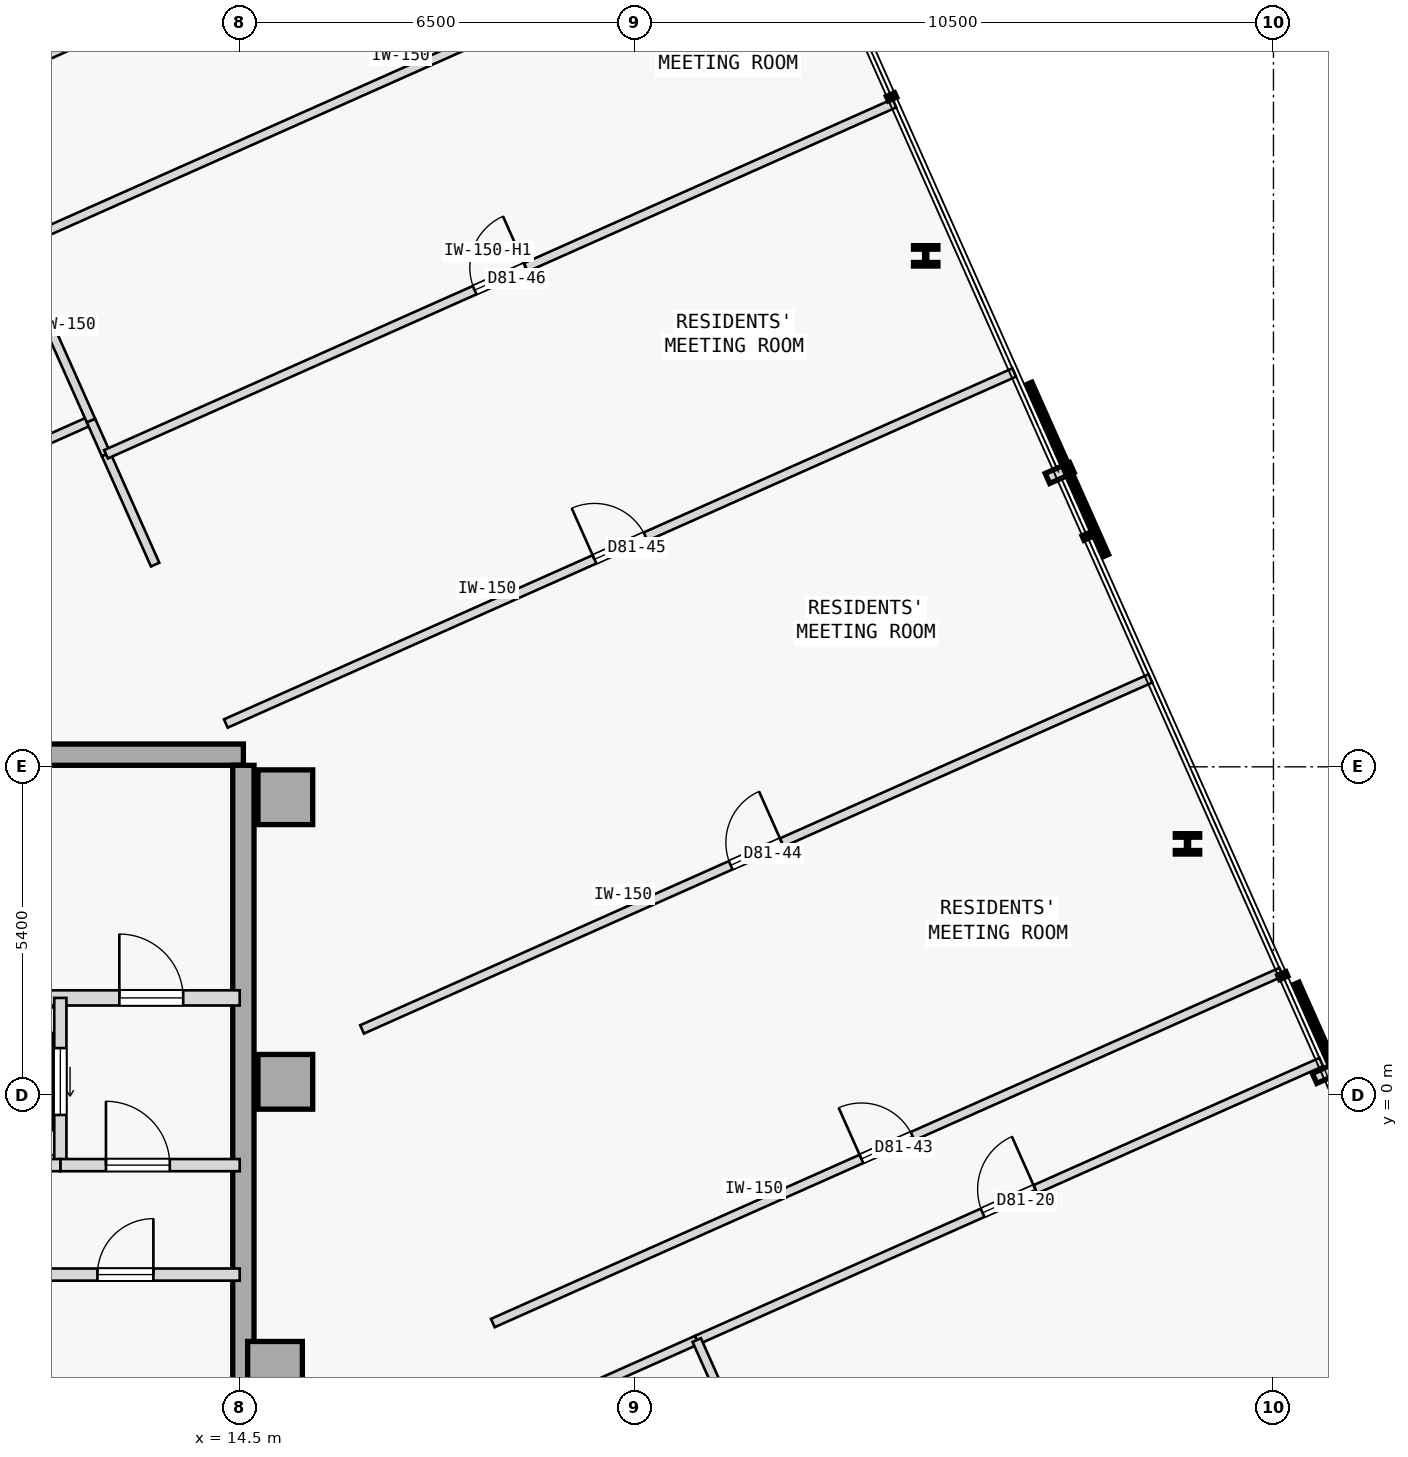
"""IFC4 building model, lengths in metres.
Left out: names, types, materials, properties, quantities, classifications, styles, units other than length and angle.
Written with IfcOpenShell. Run it as: python <this file> out.ifc"""

import sys

from ifc_helpers import new_model, si_unit, direction, frame, frame_2d, origin, origin_2d, place, context, subcontext, project, spatial, rectangle, i_section, extrude, element, fill, save


model = new_model("IFC4")
c1 = context("Model", 3, precision=1e-05, world=origin(), true_north=direction((0.0, 1.0)))
c2 = subcontext(c1, "Body", "Model", "MODEL_VIEW")
j1 = project(units=[si_unit("LENGTHUNIT", "METRE"), si_unit("PLANEANGLEUNIT", "RADIAN")], contexts=[c1])
p1 = place(None, origin())
s1 = spatial("IfcSite", under=j1, at=p1, CompositionType="ELEMENT")
p2 = place(p1, origin())
s2 = spatial("IfcBuilding", under=s1, at=p2, CompositionType="ELEMENT")
p3 = place(p2, frame((0.0, 0.0, 302.0)))
s3 = spatial("IfcBuildingStorey", under=s2, at=p3, CompositionType="ELEMENT", Elevation=302.0)
for number, where, z_axis, x_axis in (
    (1, (15.25, 4.9, 0.0), (0.0, 0.0, 1.0), (1.0, 0.0, 0.0)),
    (2, (15.25, 0.22, 0.0), (0.0, 0.0, 1.0), (1.0, 0.0, 0.0)),
    (3, (15.08, -4.5, 0.0), (0.0, 0.0, 1.0), (1.0, 0.0, 0.0)),
):
    element("IfcColumn", number, at=place(p3, frame(where, z_axis=z_axis, x_axis=x_axis)), inside=s3, PredefinedType="COLUMN", context=c2, shape_type="SweptSolid", body=[
        extrude(rectangle(XDim=0.9, YDim=0.9, at=origin_2d()), origin(), (0.0, 0.0, 1.0), 3.55),
    ])
p4 = place(p3, frame((3.15, 5.6, 0.0), z_axis=(0.0, 0.0, 1.0), x_axis=(1.0, 0.0, 0.0)))
e4 = element("IfcWall", 4, at=p4, inside=s3, PredefinedType="SHEAR", context=c2, shape_type="SweptSolid", body=[
    extrude(rectangle(XDim=11.41, YDim=0.35, at=frame_2d((5.705, 0.0))), origin(), (0.0, 0.0, 1.0), 3.145),
])
p5 = place(p3, frame((14.56, -5.425, 0.0), z_axis=(0.0, 0.0, 1.0), x_axis=(0.0, 1.0, 0.0)))
e5 = element("IfcWall", 5, at=p5, inside=s3, PredefinedType="SHEAR", context=c2, shape_type="SweptSolid", body=[
    extrude(rectangle(XDim=10.85, YDim=0.35, at=frame_2d((5.425, 0.0))), origin(), (0.0, 0.0, 1.0), 3.145),
])
for number, where, z_axis, x_axis in (
    (6, (30.086, 4.133, 0.0), (0.0, 0.0, 1.0), (1.0, 0.0, 0.0)),
    (7, (25.781, 13.803, 0.0), (0.0, 0.0, 1.0), (1.0, 0.0, 0.0)),
):
    element("IfcColumn", number, at=place(p3, frame(where, z_axis=z_axis, x_axis=x_axis)), inside=s3, PredefinedType="COLUMN", context=c2, shape_type="SweptSolid", body=[
        extrude(i_section(OverallWidth=0.401, OverallDepth=0.335, WebThickness=0.036, FlangeThickness=0.058, FilletRadius=0.015, at=origin_2d()), origin(), (0.0, 0.0, 1.0), 3.55),
    ])
p6 = place(p3, frame((10.9, 1.6, 0.0), z_axis=(0.0, 0.0, 1.0), x_axis=(1.0, 0.0, 0.0)))
e8 = element("IfcWall", 8, at=p6, inside=s3, PredefinedType="STANDARD", context=c2, shape_type="SweptSolid", body=[
    extrude(rectangle(XDim=3.6, YDim=0.25, at=frame_2d((1.8, 0.0))), origin(), (0.0, 0.0, 1.0), 3.145),
])
p7 = place(p6, frame((1.62, 0.0, 0.0)))
e9 = element("IfcOpeningElement", 9, at=p7, cuts=e8, PredefinedType="OPENING", context=c2, shape_type="SweptSolid", body=[
    extrude(rectangle(XDim=1.05, YDim=2.15, at=frame_2d((0.525, 1.075))), frame((0.0, 0.135, 0.0), z_axis=(0.0, -1.0, 0.0), x_axis=(1.0, 0.0, 0.0)), (0.0, 0.0, 1.0), 0.27),
])
p8 = place(p3, frame((11.55, -1.15, 0.0), z_axis=(0.0, 0.0, 1.0), x_axis=(0.0, 1.0, 0.0)))
e10 = element("IfcWall", 10, at=p8, inside=s3, PredefinedType="STANDARD", context=c2, shape_type="SweptSolid", body=[
    extrude(rectangle(XDim=2.75, YDim=0.2, at=frame_2d((1.375, 0.0))), origin(), (0.0, 0.0, 1.0), 3.145),
])
p9 = place(p8, frame((0.825, 0.0, 0.0)))
e11 = element("IfcOpeningElement", 11, at=p9, cuts=e10, PredefinedType="OPENING", context=c2, shape_type="SweptSolid", body=[
    extrude(rectangle(XDim=1.1, YDim=2.15, at=frame_2d((0.55, 1.075))), frame((0.0, 0.11, 0.0), z_axis=(0.0, -1.0, 0.0), x_axis=(1.0, 0.0, 0.0)), (0.0, 0.0, 1.0), 0.22),
])
p10 = place(p3, frame((11.55, -1.15, 0.0), z_axis=(0.0, 0.0, 1.0), x_axis=(1.0, 0.0, 0.0)))
e12 = element("IfcWall", 12, at=p10, inside=s3, PredefinedType="STANDARD", context=c2, shape_type="SweptSolid", body=[
    extrude(rectangle(XDim=2.95, YDim=0.2, at=frame_2d((1.475, 0.0))), origin(), (0.0, 0.0, 1.0), 3.145),
])
p11 = place(p10, frame((0.75, 0.0, 0.0)))
e13 = element("IfcOpeningElement", 13, at=p11, cuts=e12, PredefinedType="OPENING", context=c2, shape_type="SweptSolid", body=[
    extrude(rectangle(XDim=1.05, YDim=2.18, at=frame_2d((0.525, 1.09))), frame((0.0, 0.11, 0.0), z_axis=(0.0, -1.0, 0.0), x_axis=(1.0, 0.0, 0.0)), (0.0, 0.0, 1.0), 0.22),
])
p12 = place(p3, frame((9.35, -1.15, 0.0), z_axis=(0.0, 0.0, 1.0), x_axis=(1.0, 0.0, 0.0)))
e14 = element("IfcWall", 14, at=p12, inside=s3, PredefinedType="STANDARD", context=c2, shape_type="SweptSolid", body=[
    extrude(rectangle(XDim=2.2, YDim=0.2, at=frame_2d((1.1, 0.0))), origin(), (0.0, 0.0, 1.0), 3.145),
])
p13 = place(p3, frame((3.7, -2.95, 0.0), z_axis=(0.0, 0.0, 1.0), x_axis=(1.0, 0.0, 0.0)))
e15 = element("IfcWall", 15, at=p13, inside=s3, PredefinedType="STANDARD", context=c2, shape_type="SweptSolid", body=[
    extrude(rectangle(XDim=10.8, YDim=0.2, at=frame_2d((5.4, 0.0))), origin(), (0.0, 0.0, 1.0), 3.145),
])
p14 = place(p13, frame((0.53, 0.0, 0.0)))
e16 = element("IfcOpeningElement", 16, at=p14, cuts=e15, PredefinedType="OPENING", context=c2, shape_type="SweptSolid", body=[
    extrude(rectangle(XDim=1.1, YDim=2.15, at=frame_2d((0.55, 1.075))), frame((0.0, 0.11, 0.0), z_axis=(0.0, -1.0, 0.0), x_axis=(1.0, 0.0, 0.0)), (0.0, 0.0, 1.0), 0.22),
])
p15 = place(p13, frame((4.14, 0.0, 0.0)))
e17 = element("IfcOpeningElement", 17, at=p15, cuts=e15, PredefinedType="OPENING", context=c2, shape_type="SweptSolid", body=[
    extrude(rectangle(XDim=0.92, YDim=2.04, at=frame_2d((0.46, 1.02))), frame((0.0, 0.11, 0.0), z_axis=(0.0, -1.0, 0.0), x_axis=(1.0, 0.0, 0.0)), (0.0, 0.0, 1.0), 0.22),
])
p16 = place(p13, frame((8.46, 0.0, 0.0)))
e18 = element("IfcOpeningElement", 18, at=p16, cuts=e15, PredefinedType="OPENING", context=c2, shape_type="SweptSolid", body=[
    extrude(rectangle(XDim=0.92, YDim=2.04, at=frame_2d((0.46, 1.02))), frame((0.0, 0.11, 0.0), z_axis=(0.0, -1.0, 0.0), x_axis=(1.0, 0.0, 0.0)), (0.0, 0.0, 1.0), 0.22),
])
p17 = place(p3, frame((22.016, -4.027, 0.0), z_axis=(0.0, 0.0, 1.0), x_axis=(0.913548968583, 0.406728757282, 0.0)))
e19 = element("IfcWall", 19, at=p17, inside=s3, PredefinedType="PARTITIONING", context=c2, shape_type="SweptSolid", body=[
    extrude(rectangle(XDim=11.242, YDim=0.15, at=frame_2d((5.621, 0.0))), origin(), (0.0, 0.0, 1.0), 3.145),
])
p18 = place(p17, frame((5.146, 0.0, 0.0)))
e20 = element("IfcOpeningElement", 20, at=p18, cuts=e19, PredefinedType="OPENING", context=c2, shape_type="SweptSolid", body=[
    extrude(rectangle(XDim=0.95, YDim=2.04, at=frame_2d((0.475, 1.02))), frame((0.0, 0.085, 0.0), z_axis=(0.0, -1.0, 0.0), x_axis=(1.0, 0.0, 0.0)), (0.0, 0.0, 1.0), 0.17),
])
p19 = place(p3, frame((18.818, -5.451, 0.0), z_axis=(0.0, 0.0, 1.0), x_axis=(0.913538066796, 0.406753242783, 0.0)))
e21 = element("IfcWall", 21, at=p19, inside=s3, PredefinedType="PARTITIONING", context=c2, shape_type="SweptSolid", body=[
    extrude(rectangle(XDim=3.5, YDim=0.15, at=frame_2d((1.75, 0.0))), origin(), (0.0, 0.0, 1.0), 3.145),
])
p20 = place(p3, frame((18.662, -3.747, 0.0), z_axis=(0.0, 0.0, 1.0), x_axis=(0.913544622417, 0.406738519018, 0.0)))
e22 = element("IfcWall", 22, at=p20, inside=s3, PredefinedType="PARTITIONING", context=c2, shape_type="SweptSolid", body=[
    extrude(rectangle(XDim=14.192, YDim=0.15, at=frame_2d((7.096, 0.0))), origin(), (0.0, 0.0, 1.0), 3.145),
])
p21 = place(p20, frame((6.636, 0.0, 0.0)))
e23 = element("IfcOpeningElement", 23, at=p21, cuts=e22, PredefinedType="OPENING", context=c2, shape_type="SweptSolid", body=[
    extrude(rectangle(XDim=0.92, YDim=2.04, at=frame_2d((0.46, 1.02))), frame((0.0, 0.085, 0.0), z_axis=(0.0, -1.0, 0.0), x_axis=(1.0, 0.0, 0.0)), (0.0, 0.0, 1.0), 0.17),
])
p22 = place(p3, frame((9.703, 16.375, 0.0), z_axis=(0.0, 0.0, 1.0), x_axis=(0.913544622417, 0.406738519018, 0.0)))
e24 = element("IfcWall", 24, at=p22, inside=s3, PredefinedType="PARTITIONING", context=c2, shape_type="SweptSolid", body=[
    extrude(rectangle(XDim=14.192, YDim=0.15, at=frame_2d((7.096, 0.0))), origin(), (0.0, 0.0, 1.0), 3.145),
])
p23 = place(p22, frame((6.636, 0.0, 0.0)))
e25 = element("IfcOpeningElement", 25, at=p23, cuts=e24, PredefinedType="OPENING", context=c2, shape_type="SweptSolid", body=[
    extrude(rectangle(XDim=0.92, YDim=2.04, at=frame_2d((0.46, 1.02))), frame((0.0, 0.085, 0.0), z_axis=(0.0, -1.0, 0.0), x_axis=(1.0, 0.0, 0.0)), (0.0, 0.0, 1.0), 0.17),
])
p24 = place(p3, frame((22.911, -6.037, 0.0), z_axis=(0.0, 0.0, 1.0), x_axis=(-0.40677666873, 0.913527636022, 0.0)))
e26 = element("IfcWall", 26, at=p24, inside=s3, PredefinedType="PARTITIONING", context=c2, shape_type="SweptSolid", body=[
    extrude(rectangle(XDim=2.2, YDim=0.15, at=frame_2d((1.1, 0.0))), origin(), (0.0, 0.0, 1.0), 3.145),
])
p25 = place(p3, frame((3.7, 7.376, 0.0), z_axis=(0.0, 0.0, 1.0), x_axis=(0.91354490899, 0.406737875367, 0.0)))
e27 = element("IfcWall", 27, at=p25, inside=s3, PredefinedType="PARTITIONING", context=c2, shape_type="SweptSolid", body=[
    extrude(rectangle(XDim=9.144, YDim=0.15, at=frame_2d((4.572, 0.0))), origin(), (0.0, 0.0, 1.0), 3.145),
])
p26 = place(p3, frame((13.109, 8.726, 0.0), z_axis=(0.0, 0.0, 1.0), x_axis=(-0.406788519224, 0.913522359128, 0.0)))
e28 = element("IfcWall", 28, at=p26, inside=s3, PredefinedType="PARTITIONING", context=c2, shape_type="SweptSolid", body=[
    extrude(rectangle(XDim=1.986, YDim=0.15, at=frame_2d((0.993, 0.0))), origin(), (0.0, 0.0, 1.0), 3.145),
])
p27 = place(p3, frame((12.301, 10.54, 0.0), z_axis=(0.0, 0.0, 1.0), x_axis=(-0.406436552015, 0.913679007741, 0.0)))
e29 = element("IfcWall", 29, at=p27, inside=s3, PredefinedType="PARTITIONING", context=c2, shape_type="SweptSolid", body=[
    extrude(rectangle(XDim=0.608, YDim=0.15, at=frame_2d((0.304, 0.0))), origin(), (0.0, 0.0, 1.0), 3.145),
])
p28 = place(p3, frame((12.054, 11.095, 0.0), z_axis=(0.0, 0.0, 1.0), x_axis=(-0.406798922371, 0.91351772657, 0.0)))
e30 = element("IfcWall", 30, at=p28, inside=s3, PredefinedType="PARTITIONING", context=c2, shape_type="SweptSolid", body=[
    extrude(rectangle(XDim=2.949, YDim=0.15, at=frame_2d((1.475, 0.0))), origin(), (0.0, 0.0, 1.0), 3.145),
])
p29 = place(p3, frame((16.512, 1.082, 0.0), z_axis=(0.0, 0.0, 1.0), x_axis=(0.913544622417, 0.406738519018, 0.0)))
e31 = element("IfcWall", 31, at=p29, inside=s3, PredefinedType="PARTITIONING", context=c2, shape_type="SweptSolid", body=[
    extrude(rectangle(XDim=14.192, YDim=0.15, at=frame_2d((7.096, 0.0))), origin(), (0.0, 0.0, 1.0), 3.145),
])
p30 = place(p29, frame((6.636, 0.0, 0.0)))
e32 = element("IfcOpeningElement", 32, at=p30, cuts=e31, PredefinedType="OPENING", context=c2, shape_type="SweptSolid", body=[
    extrude(rectangle(XDim=0.92, YDim=2.04, at=frame_2d((0.46, 1.02))), frame((0.0, 0.085, 0.0), z_axis=(0.0, -1.0, 0.0), x_axis=(1.0, 0.0, 0.0)), (0.0, 0.0, 1.0), 0.17),
])
p31 = place(p3, frame((14.272, 6.113, 0.0), z_axis=(0.0, 0.0, 1.0), x_axis=(0.913551014388, 0.406724162191, 0.0)))
e33 = element("IfcWall", 33, at=p31, inside=s3, PredefinedType="PARTITIONING", context=c2, shape_type="SweptSolid", body=[
    extrude(rectangle(XDim=14.192, YDim=0.15, at=frame_2d((7.096, 0.0))), origin(), (0.0, 0.0, 1.0), 3.145),
])
p32 = place(p31, frame((6.636, 0.0, 0.0)))
e34 = element("IfcOpeningElement", 34, at=p32, cuts=e33, PredefinedType="OPENING", context=c2, shape_type="SweptSolid", body=[
    extrude(rectangle(XDim=0.92, YDim=2.04, at=frame_2d((0.46, 1.02))), frame((0.0, 0.085, 0.0), z_axis=(0.0, -1.0, 0.0), x_axis=(1.0, 0.0, 0.0)), (0.0, 0.0, 1.0), 0.17),
])
p33 = place(p3, frame((12.301, 10.54, 0.0), z_axis=(0.0, 0.0, 1.0), x_axis=(0.913544622417, 0.406738519018, 0.0)))
e35 = element("IfcWall", 35, at=p33, inside=s3, PredefinedType="PARTITIONING", context=c2, shape_type="SweptSolid", body=[
    extrude(rectangle(XDim=14.192, YDim=0.15, at=frame_2d((7.096, 0.0))), origin(), (0.0, 0.0, 1.0), 2.695),
])
p34 = place(p33, frame((6.636, 0.0, 0.0)))
e36 = element("IfcOpeningElement", 36, at=p34, cuts=e35, PredefinedType="OPENING", context=c2, shape_type="SweptSolid", body=[
    extrude(rectangle(XDim=0.92, YDim=2.04, at=frame_2d((0.46, 1.02))), frame((0.0, 0.085, 0.0), z_axis=(0.0, -1.0, 0.0), x_axis=(1.0, 0.0, 0.0)), (0.0, 0.0, 1.0), 0.17),
])
p35 = place(p3, frame((10.778, 13.961, 0.0), z_axis=(0.0, 0.0, 1.0), x_axis=(0.913544622417, 0.406738519018, 0.0)))
e37 = element("IfcWall", 37, at=p35, inside=s3, PredefinedType="PARTITIONING", context=c2, shape_type="SweptSolid", body=[
    extrude(rectangle(XDim=14.192, YDim=0.15, at=frame_2d((7.096, 0.0))), origin(), (0.0, 0.0, 1.0), 3.145),
])
p36 = place(p7, origin())
e38 = element("IfcDoor", 38, at=p36, inside=s3, OperationType="SINGLE_SWING_LEFT", PredefinedType="DOOR", context=c2, shape_type="SweptSolid", body=[
    extrude(rectangle(XDim=1.05, YDim=2.15, at=frame_2d((0.525, 1.075))), frame((0.0, 0.025, 0.0), z_axis=(0.0, -1.0, 0.0), x_axis=(1.0, 0.0, 0.0)), (0.0, 0.0, 1.0), 0.05),
])
fill(e9, e38)
p37 = place(p11, origin())
e39 = element("IfcDoor", 39, at=p37, inside=s3, OperationType="SINGLE_SWING_LEFT", PredefinedType="DOOR", context=c2, shape_type="SweptSolid", body=[
    extrude(rectangle(XDim=1.05, YDim=2.18, at=frame_2d((0.525, 1.09))), frame((0.0, 0.025, 0.0), z_axis=(0.0, -1.0, 0.0), x_axis=(1.0, 0.0, 0.0)), (0.0, 0.0, 1.0), 0.05),
])
fill(e13, e39)
p38 = place(p9, origin())
e40 = element("IfcDoor", 40, at=p38, inside=s3, OperationType="SLIDING_TO_RIGHT", PredefinedType="DOOR", context=c2, shape_type="SweptSolid", body=[
    extrude(rectangle(XDim=1.1, YDim=2.15, at=frame_2d((0.55, 1.075))), frame((0.0, 0.025, 0.0), z_axis=(0.0, -1.0, 0.0), x_axis=(1.0, 0.0, 0.0)), (0.0, 0.0, 1.0), 0.05),
])
fill(e11, e40)
p39 = place(p16, origin())
e41 = element("IfcDoor", 41, at=p39, inside=s3, OperationType="SINGLE_SWING_RIGHT", PredefinedType="DOOR", context=c2, shape_type="SweptSolid", body=[
    extrude(rectangle(XDim=0.92, YDim=2.04, at=frame_2d((0.46, 1.02))), frame((0.0, 0.025, 0.0), z_axis=(0.0, -1.0, 0.0), x_axis=(1.0, 0.0, 0.0)), (0.0, 0.0, 1.0), 0.05),
])
fill(e18, e41)
p40 = place(p18, origin())
e42 = element("IfcDoor", 42, at=p40, inside=s3, OperationType="SINGLE_SWING_RIGHT", PredefinedType="DOOR", context=c2, shape_type="SweptSolid", body=[
    extrude(rectangle(XDim=0.95, YDim=2.04, at=frame_2d((0.475, 1.02))), frame((0.0, 0.025, 0.0), z_axis=(0.0, -1.0, 0.0), x_axis=(1.0, 0.0, 0.0)), (0.0, 0.0, 1.0), 0.05),
])
fill(e20, e42)
p41 = place(p21, origin())
e43 = element("IfcDoor", 43, at=p41, inside=s3, OperationType="SINGLE_SWING_LEFT", PredefinedType="DOOR", context=c2, shape_type="SweptSolid", body=[
    extrude(rectangle(XDim=0.92, YDim=2.04, at=frame_2d((0.46, 1.02))), frame((0.0, 0.025, 0.0), z_axis=(0.0, -1.0, 0.0), x_axis=(1.0, 0.0, 0.0)), (0.0, 0.0, 1.0), 0.05),
])
fill(e23, e43)
p42 = place(p30, origin())
e44 = element("IfcDoor", 44, at=p42, inside=s3, OperationType="SINGLE_SWING_RIGHT", PredefinedType="DOOR", context=c2, shape_type="SweptSolid", body=[
    extrude(rectangle(XDim=0.92, YDim=2.04, at=frame_2d((0.46, 1.02))), frame((0.0, 0.025, 0.0), z_axis=(0.0, -1.0, 0.0), x_axis=(1.0, 0.0, 0.0)), (0.0, 0.0, 1.0), 0.05),
])
fill(e32, e44)
p43 = place(p32, origin())
e45 = element("IfcDoor", 45, at=p43, inside=s3, OperationType="SINGLE_SWING_LEFT", PredefinedType="DOOR", context=c2, shape_type="SweptSolid", body=[
    extrude(rectangle(XDim=0.92, YDim=2.04, at=frame_2d((0.46, 1.02))), frame((0.0, 0.025, 0.0), z_axis=(0.0, -1.0, 0.0), x_axis=(1.0, 0.0, 0.0)), (0.0, 0.0, 1.0), 0.05),
])
fill(e34, e45)
p44 = place(p34, origin())
e46 = element("IfcDoor", 46, at=p44, inside=s3, OperationType="SINGLE_SWING_RIGHT", PredefinedType="DOOR", context=c2, shape_type="SweptSolid", body=[
    extrude(rectangle(XDim=0.92, YDim=2.04, at=frame_2d((0.46, 1.02))), frame((0.0, 0.025, 0.0), z_axis=(0.0, -1.0, 0.0), x_axis=(1.0, 0.0, 0.0)), (0.0, 0.0, 1.0), 0.05),
])
fill(e36, e46)
save(model, sys.argv[1])
